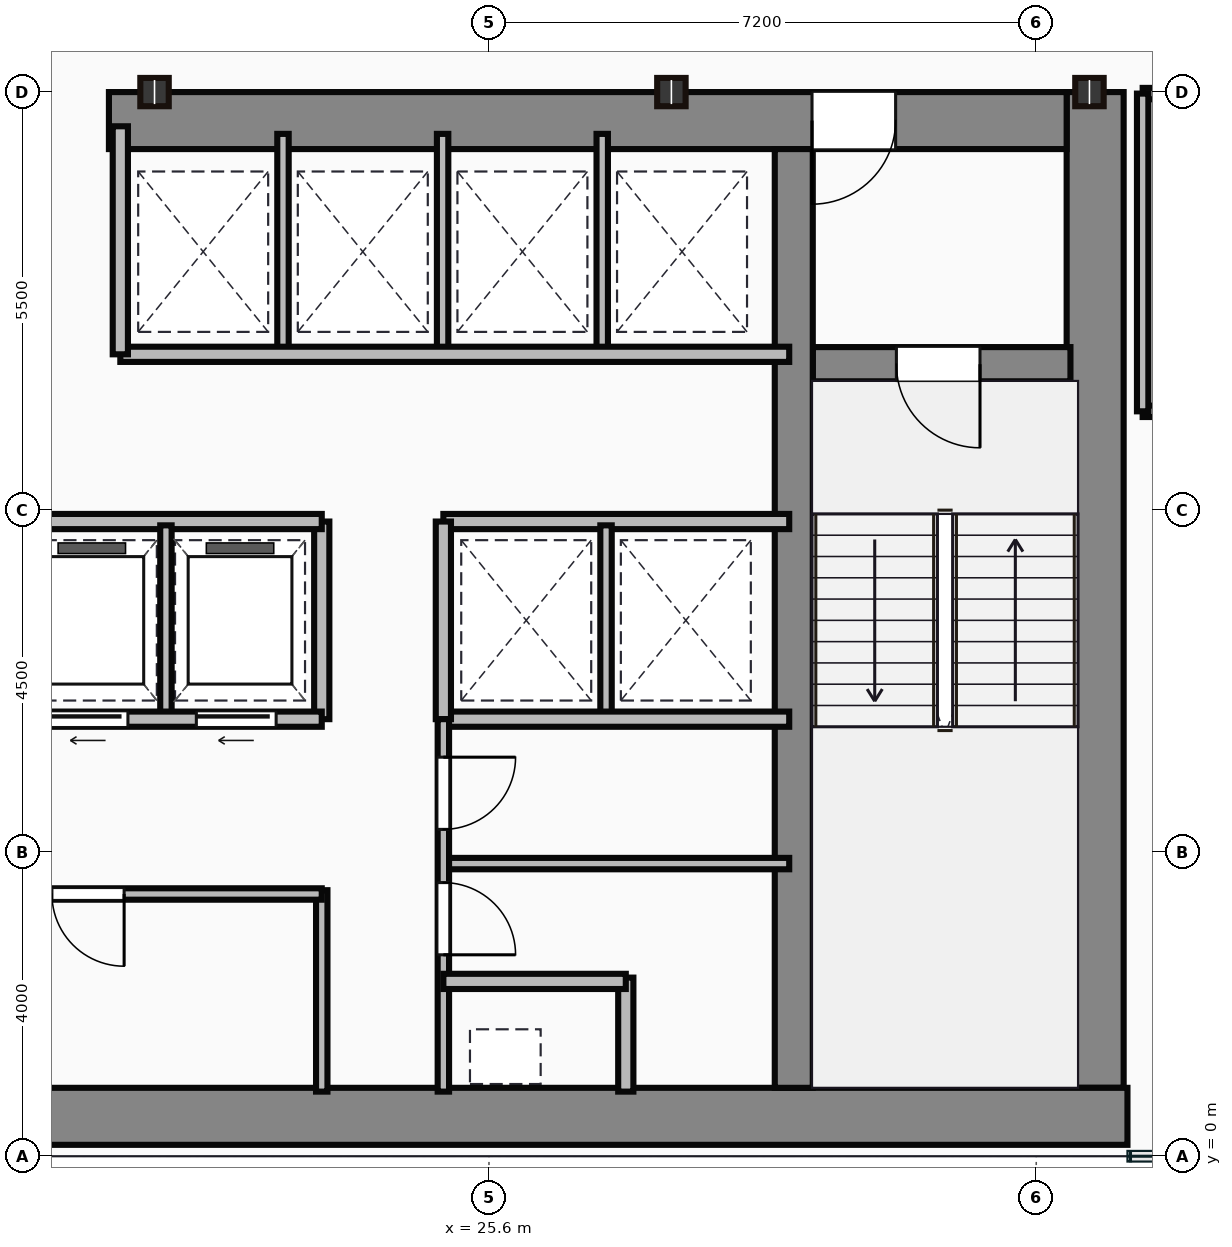
"""IFC4 building model, lengths in metres.
Left out: names, types, materials, properties, quantities, classifications, styles, units other than length and angle.
Written with IfcOpenShell. Run it as: python <this file> out.ifc"""

import sys

from ifc_helpers import new_model, si_unit, direction, frame, frame_2d, origin, origin_2d, place, context, subcontext, project, spatial, rectangle, i_section, extrude, source, transform, mapped, element, fill, save


model = new_model("IFC4")
c1 = context("Model", 3, precision=1e-05, world=origin(), true_north=direction((0.0, 1.0)))
c2 = subcontext(c1, "Body", "Model", "MODEL_VIEW")
j1 = project(units=[si_unit("LENGTHUNIT", "METRE"), si_unit("PLANEANGLEUNIT", "RADIAN")], contexts=[c1])
p1 = place(None, origin())
s1 = spatial("IfcSite", under=j1, at=p1, CompositionType="ELEMENT")
p2 = place(p1, origin())
s2 = spatial("IfcBuilding", under=s1, at=p2, CompositionType="ELEMENT")
p3 = place(p2, frame((0.0, 0.0, 144.25)))
s3 = spatial("IfcBuildingStorey", under=s2, at=p3, CompositionType="ELEMENT", Elevation=144.25)
m1 = source(origin(), c2, "Body", "SweptSolid", [
    extrude(rectangle(XDim=29.5, YDim=0.75, at=frame_2d((14.75, 0.0))), origin(), (0.0, 0.0, 1.0), 3.65),
])
p4 = place(p3, frame((4.5, 0.525, 0.0), z_axis=(0.0, 0.0, 1.0), x_axis=(1.0, 0.0, 0.0)))
e1 = element("IfcWall", 1, at=p4, inside=s3, PredefinedType="SHEAR", context=c2, shape_type="MappedRepresentation", body=[
    mapped(m1, transform((0.0, 0.0, 0.0))),
])
m2 = source(origin(), c2, "Body", "SweptSolid", [
    extrude(rectangle(XDim=13.1, YDim=0.75, at=frame_2d((6.55, 0.0))), origin(), (0.0, 0.0, 1.0), 3.65),
])
p5 = place(p3, frame((33.575, 0.9, 0.0), z_axis=(0.0, 0.0, 1.0), x_axis=(0.0, 1.0, 0.0)))
e2 = element("IfcWall", 2, at=p5, inside=s3, PredefinedType="SHEAR", context=c2, shape_type="MappedRepresentation", body=[
    mapped(m2, transform((0.0, 0.0, 0.0))),
])
m3 = source(origin(), c2, "Body", "SweptSolid", [
    extrude(rectangle(XDim=12.6, YDim=0.75, at=frame_2d((6.3, 0.0))), origin(), (0.0, 0.0, 1.0), 3.65),
])
p6 = place(p3, frame((20.6, 13.625, 0.0), z_axis=(0.0, 0.0, 1.0), x_axis=(1.0, 0.0, 0.0)))
e3 = element("IfcWall", 3, at=p6, inside=s3, PredefinedType="SHEAR", context=c2, shape_type="MappedRepresentation", body=[
    mapped(m3, transform((0.0, 0.0, 0.0))),
])
p7 = place(p6, frame((9.25, 0.0, 0.0)))
e4 = element("IfcOpeningElement", 4, at=p7, cuts=e3, PredefinedType="OPENING", context=c2, shape_type="SweptSolid", body=[
    extrude(rectangle(XDim=1.1, YDim=2.15, at=frame_2d((0.55, 1.075))), frame((0.0, 0.385, 0.0), z_axis=(0.0, -1.0, 0.0), x_axis=(1.0, 0.0, 0.0)), (0.0, 0.0, 1.0), 0.77),
])
m4 = source(origin(), c2, "Body", "SweptSolid", [
    extrude(rectangle(XDim=12.35, YDim=0.5, at=frame_2d((6.175, 0.0))), origin(), (0.0, 0.0, 1.0), 3.65),
])
p8 = place(p3, frame((29.61, 0.9, 0.0), z_axis=(0.0, 0.0, 1.0), x_axis=(0.0, 1.0, 0.0)))
e5 = element("IfcWall", 5, at=p8, inside=s3, PredefinedType="SHEAR", context=c2, shape_type="MappedRepresentation", body=[
    mapped(m4, transform((0.0, 0.0, 0.0))),
])
m5 = source(origin(), c2, "Body", "SweptSolid", [
    extrude(rectangle(XDim=3.39, YDim=0.45, at=frame_2d((1.695, 0.0))), origin(), (0.0, 0.0, 1.0), 3.65),
])
p9 = place(p3, frame((29.86, 10.42, 0.0), z_axis=(0.0, 0.0, 1.0), x_axis=(1.0, 0.0, 0.0)))
e6 = element("IfcWall", 6, at=p9, inside=s3, PredefinedType="SHEAR", context=c2, shape_type="MappedRepresentation", body=[
    mapped(m5, transform((0.0, 0.0, 0.0))),
])
p10 = place(p9, frame((1.1, 0.0, 0.0)))
e7 = element("IfcOpeningElement", 7, at=p10, cuts=e6, PredefinedType="OPENING", context=c2, shape_type="SweptSolid", body=[
    extrude(rectangle(XDim=1.1, YDim=2.15, at=frame_2d((0.55, 1.075))), frame((0.0, 0.235, 0.0), z_axis=(0.0, -1.0, 0.0), x_axis=(1.0, 0.0, 0.0)), (0.0, 0.0, 1.0), 0.47),
])
m6 = source(origin(), c2, "Body", "SweptSolid", [
    extrude(i_section(OverallWidth=0.374, OverallDepth=0.372, WebThickness=0.016, FlangeThickness=0.026, at=origin_2d()), origin(), (0.0, 0.0, 1.0), 3.65),
])
for number, where, z_axis, x_axis in (
    (8, (21.2, 14.0, 0.0), (0.0, 0.0, 1.0), (1.0, 0.0, 0.0)),
    (9, (28.0, 14.0, 0.0), (0.0, 0.0, 1.0), (1.0, 0.0, 0.0)),
    (10, (33.5, 14.0, 0.0), (0.0, 0.0, 1.0), (1.0, 0.0, 0.0)),
):
    element("IfcColumn", number, at=place(p3, frame(where, z_axis=z_axis, x_axis=x_axis)), inside=s3, PredefinedType="COLUMN", context=c2, shape_type="MappedRepresentation", body=[
        mapped(m6, transform((0.0, 0.0, 0.0))),
    ])
m7 = source(origin(), c2, "Body", "SweptSolid", [
    extrude(rectangle(XDim=10.35, YDim=0.15, at=frame_2d((5.175, 0.0))), origin(), (0.0, 0.0, 1.0), 3.4),
])
p11 = place(p3, frame((13.05, 3.45, 0.0), z_axis=(0.0, 0.0, 1.0), x_axis=(1.0, 0.0, 0.0)))
e11 = element("IfcWall", 11, at=p11, inside=s3, PredefinedType="PARTITIONING", context=c2, shape_type="MappedRepresentation", body=[
    mapped(m7, transform((0.0, 0.0, 0.0))),
])
p12 = place(p11, frame((2.1, 0.0, 0.0)))
e12 = element("IfcOpeningElement", 12, at=p12, cuts=e11, PredefinedType="OPENING", context=c2, shape_type="SweptSolid", body=[
    extrude(rectangle(XDim=0.95, YDim=2.15, at=frame_2d((0.475, 1.075))), frame((0.0, 0.085, 0.0), z_axis=(0.0, -1.0, 0.0), x_axis=(1.0, 0.0, 0.0)), (0.0, 0.0, 1.0), 0.17),
])
p13 = place(p11, frame((6.8, 0.0, 0.0)))
e13 = element("IfcOpeningElement", 13, at=p13, cuts=e11, PredefinedType="OPENING", context=c2, shape_type="SweptSolid", body=[
    extrude(rectangle(XDim=0.95, YDim=2.15, at=frame_2d((0.475, 1.075))), frame((0.0, 0.085, 0.0), z_axis=(0.0, -1.0, 0.0), x_axis=(1.0, 0.0, 0.0)), (0.0, 0.0, 1.0), 0.17),
])
m8 = source(origin(), c2, "Body", "SweptSolid", [
    extrude(rectangle(XDim=2.65, YDim=0.15, at=frame_2d((1.325, 0.0))), origin(), (0.0, 0.0, 1.0), 3.4),
])
p14 = place(p3, frame((23.4, 0.85, 0.0), z_axis=(0.0, 0.0, 1.0), x_axis=(0.0, 1.0, 0.0)))
e14 = element("IfcWall", 14, at=p14, inside=s3, PredefinedType="PARTITIONING", context=c2, shape_type="MappedRepresentation", body=[
    mapped(m8, transform((0.0, 0.0, 0.0))),
])
m9 = source(origin(), c2, "Body", "SweptSolid", [
    extrude(rectangle(XDim=11.85, YDim=0.2, at=frame_2d((5.925, 0.0))), origin(), (0.0, 0.0, 1.0), 3.4),
])
p15 = place(p3, frame((11.55, 5.75, 0.0), z_axis=(0.0, 0.0, 1.0), x_axis=(1.0, 0.0, 0.0)))
e15 = element("IfcWall", 15, at=p15, inside=s3, PredefinedType="PARTITIONING", context=c2, shape_type="MappedRepresentation", body=[
    mapped(m9, transform((0.0, 0.0, 0.0))),
])
p16 = place(p15, frame((0.45, 0.0, 0.0)))
e16 = element("IfcOpeningElement", 16, at=p16, cuts=e15, PredefinedType="OPENING", context=c2, shape_type="SweptSolid", body=[
    extrude(rectangle(XDim=1.05, YDim=2.15, at=frame_2d((0.525, 1.075))), frame((0.0, 0.11, 0.0), z_axis=(0.0, -1.0, 0.0), x_axis=(1.0, 0.0, 0.0)), (0.0, 0.0, 1.0), 0.22),
])
p17 = place(p15, frame((2.4, 0.0, 0.0)))
e17 = element("IfcOpeningElement", 17, at=p17, cuts=e15, PredefinedType="OPENING", context=c2, shape_type="SweptSolid", body=[
    extrude(rectangle(XDim=1.05, YDim=2.15, at=frame_2d((0.525, 1.075))), frame((0.0, 0.11, 0.0), z_axis=(0.0, -1.0, 0.0), x_axis=(1.0, 0.0, 0.0)), (0.0, 0.0, 1.0), 0.22),
])
p18 = place(p15, frame((4.35, 0.0, 0.0)))
e18 = element("IfcOpeningElement", 18, at=p18, cuts=e15, PredefinedType="OPENING", context=c2, shape_type="SweptSolid", body=[
    extrude(rectangle(XDim=1.05, YDim=2.15, at=frame_2d((0.525, 1.075))), frame((0.0, 0.11, 0.0), z_axis=(0.0, -1.0, 0.0), x_axis=(1.0, 0.0, 0.0)), (0.0, 0.0, 1.0), 0.22),
])
p19 = place(p15, frame((6.3, 0.0, 0.0)))
e19 = element("IfcOpeningElement", 19, at=p19, cuts=e15, PredefinedType="OPENING", context=c2, shape_type="SweptSolid", body=[
    extrude(rectangle(XDim=1.05, YDim=2.15, at=frame_2d((0.525, 1.075))), frame((0.0, 0.11, 0.0), z_axis=(0.0, -1.0, 0.0), x_axis=(1.0, 0.0, 0.0)), (0.0, 0.0, 1.0), 0.22),
])
p20 = place(p15, frame((8.25, 0.0, 0.0)))
e20 = element("IfcOpeningElement", 20, at=p20, cuts=e15, PredefinedType="OPENING", context=c2, shape_type="SweptSolid", body=[
    extrude(rectangle(XDim=1.05, YDim=2.15, at=frame_2d((0.525, 1.075))), frame((0.0, 0.11, 0.0), z_axis=(0.0, -1.0, 0.0), x_axis=(1.0, 0.0, 0.0)), (0.0, 0.0, 1.0), 0.22),
])
p21 = place(p15, frame((10.2, 0.0, 0.0)))
e21 = element("IfcOpeningElement", 21, at=p21, cuts=e15, PredefinedType="OPENING", context=c2, shape_type="SweptSolid", body=[
    extrude(rectangle(XDim=1.05, YDim=2.15, at=frame_2d((0.525, 1.075))), frame((0.0, 0.11, 0.0), z_axis=(0.0, -1.0, 0.0), x_axis=(1.0, 0.0, 0.0)), (0.0, 0.0, 1.0), 0.22),
])
p22 = place(p3, frame((11.55, 8.35, 0.0), z_axis=(0.0, 0.0, 1.0), x_axis=(1.0, 0.0, 0.0)))
e22 = element("IfcWall", 22, at=p22, inside=s3, PredefinedType="PARTITIONING", context=c2, shape_type="MappedRepresentation", body=[
    mapped(m9, transform((0.0, 0.0, 0.0))),
])
m10 = source(origin(), c2, "Body", "SweptSolid", [
    extrude(rectangle(XDim=2.6, YDim=0.2, at=frame_2d((1.3, 0.0))), origin(), (0.0, 0.0, 1.0), 3.4),
])
p23 = place(p3, frame((23.4, 5.75, 0.0), z_axis=(0.0, 0.0, 1.0), x_axis=(0.0, 1.0, 0.0)))
e23 = element("IfcWall", 23, at=p23, inside=s3, PredefinedType="PARTITIONING", context=c2, shape_type="MappedRepresentation", body=[
    mapped(m10, transform((0.0, 0.0, 0.0))),
])
m11 = source(origin(), c2, "Body", "SweptSolid", [
    extrude(rectangle(XDim=2.5, YDim=0.15, at=frame_2d((1.25, 0.0))), origin(), (0.0, 0.0, 1.0), 3.4),
])
p24 = place(p3, frame((21.35, 5.8, 0.0), z_axis=(0.0, 0.0, 1.0), x_axis=(0.0, 1.0, 0.0)))
e24 = element("IfcWall", 24, at=p24, inside=s3, PredefinedType="PARTITIONING", context=c2, shape_type="MappedRepresentation", body=[
    mapped(m11, transform((0.0, 0.0, 0.0))),
])
m12 = source(origin(), c2, "Body", "SweptSolid", [
    extrude(rectangle(XDim=8.8, YDim=0.2, at=frame_2d((4.4, 0.0))), origin(), (0.0, 0.0, 1.0), 3.4),
])
p25 = place(p3, frame((20.75, 10.55, 0.0), z_axis=(0.0, 0.0, 1.0), x_axis=(1.0, 0.0, 0.0)))
e25 = element("IfcWall", 25, at=p25, inside=s3, PredefinedType="PARTITIONING", context=c2, shape_type="MappedRepresentation", body=[
    mapped(m12, transform((0.0, 0.0, 0.0))),
])
m13 = source(origin(), c2, "Body", "SweptSolid", [
    extrude(rectangle(XDim=3.0, YDim=0.2, at=frame_2d((1.5, 0.0))), origin(), (0.0, 0.0, 1.0), 3.4),
])
p26 = place(p3, frame((20.75, 10.55, 0.0), z_axis=(0.0, 0.0, 1.0), x_axis=(0.0, 1.0, 0.0)))
e26 = element("IfcWall", 26, at=p26, inside=s3, PredefinedType="PARTITIONING", context=c2, shape_type="MappedRepresentation", body=[
    mapped(m13, transform((0.0, 0.0, 0.0))),
])
m14 = source(origin(), c2, "Body", "SweptSolid", [
    extrude(rectangle(XDim=2.85, YDim=0.15, at=frame_2d((1.425, 0.0))), origin(), (0.0, 0.0, 1.0), 3.4),
])
for number, where, z_axis, x_axis in (
    (27, (22.89, 10.6, 0.0), (0.0, 0.0, 1.0), (0.0, 1.0, 0.0)),
    (28, (24.99, 10.6, 0.0), (0.0, 0.0, 1.0), (0.0, 1.0, 0.0)),
    (29, (27.09, 10.6, 0.0), (0.0, 0.0, 1.0), (0.0, 1.0, 0.0)),
):
    element("IfcWall", number, at=place(p3, frame(where, z_axis=z_axis, x_axis=x_axis)), inside=s3, PredefinedType="PARTITIONING", context=c2, shape_type="MappedRepresentation", body=[
        mapped(m14, transform((0.0, 0.0, 0.0))),
    ])
m15 = source(origin(), c2, "Body", "SweptSolid", [
    extrude(rectangle(XDim=4.55, YDim=0.2, at=frame_2d((2.275, 0.0))), origin(), (0.0, 0.0, 1.0), 3.4),
])
for number, where, z_axis, x_axis in (
    (30, (25.0, 8.35, 0.0), (0.0, 0.0, 1.0), (1.0, 0.0, 0.0)),
    (31, (25.0, 5.75, 0.0), (0.0, 0.0, 1.0), (1.0, 0.0, 0.0)),
):
    element("IfcWall", number, at=place(p3, frame(where, z_axis=z_axis, x_axis=x_axis)), inside=s3, PredefinedType="PARTITIONING", context=c2, shape_type="MappedRepresentation", body=[
        mapped(m15, transform((0.0, 0.0, 0.0))),
    ])
p27 = place(p3, frame((25.0, 5.75, 0.0), z_axis=(0.0, 0.0, 1.0), x_axis=(0.0, 1.0, 0.0)))
e32 = element("IfcWall", 32, at=p27, inside=s3, PredefinedType="PARTITIONING", context=c2, shape_type="MappedRepresentation", body=[
    mapped(m10, transform((0.0, 0.0, 0.0))),
])
p28 = place(p3, frame((27.14, 5.8, 0.0), z_axis=(0.0, 0.0, 1.0), x_axis=(0.0, 1.0, 0.0)))
e33 = element("IfcWall", 33, at=p28, inside=s3, PredefinedType="PARTITIONING", context=c2, shape_type="MappedRepresentation", body=[
    mapped(m11, transform((0.0, 0.0, 0.0))),
])
m16 = source(origin(), c2, "Body", "SweptSolid", [
    extrude(rectangle(XDim=4.9, YDim=0.15, at=frame_2d((2.45, 0.0))), origin(), (0.0, 0.0, 1.0), 3.4),
])
p29 = place(p3, frame((25.0, 0.85, 0.0), z_axis=(0.0, 0.0, 1.0), x_axis=(0.0, 1.0, 0.0)))
e34 = element("IfcWall", 34, at=p29, inside=s3, PredefinedType="PARTITIONING", context=c2, shape_type="MappedRepresentation", body=[
    mapped(m16, transform((0.0, 0.0, 0.0))),
])
p30 = place(p29, frame((1.8, 0.0, 0.0)))
e35 = element("IfcOpeningElement", 35, at=p30, cuts=e34, PredefinedType="OPENING", context=c2, shape_type="SweptSolid", body=[
    extrude(rectangle(XDim=0.95, YDim=2.15, at=frame_2d((0.475, 1.075))), frame((0.0, 0.085, 0.0), z_axis=(0.0, -1.0, 0.0), x_axis=(1.0, 0.0, 0.0)), (0.0, 0.0, 1.0), 0.17),
])
p31 = place(p29, frame((3.45, 0.0, 0.0)))
e36 = element("IfcOpeningElement", 36, at=p31, cuts=e34, PredefinedType="OPENING", context=c2, shape_type="SweptSolid", body=[
    extrude(rectangle(XDim=0.95, YDim=2.15, at=frame_2d((0.475, 1.075))), frame((0.0, 0.085, 0.0), z_axis=(0.0, -1.0, 0.0), x_axis=(1.0, 0.0, 0.0)), (0.0, 0.0, 1.0), 0.17),
])
m17 = source(origin(), c2, "Body", "SweptSolid", [
    extrude(rectangle(XDim=2.4, YDim=0.2, at=frame_2d((1.2, 0.0))), origin(), (0.0, 0.0, 1.0), 3.4),
])
p32 = place(p3, frame((25.0, 2.3, 0.0), z_axis=(0.0, 0.0, 1.0), x_axis=(1.0, 0.0, 0.0)))
e37 = element("IfcWall", 37, at=p32, inside=s3, PredefinedType="PARTITIONING", context=c2, shape_type="MappedRepresentation", body=[
    mapped(m17, transform((0.0, 0.0, 0.0))),
])
m18 = source(origin(), c2, "Body", "SweptSolid", [
    extrude(rectangle(XDim=1.5, YDim=0.2, at=frame_2d((0.75, 0.0))), origin(), (0.0, 0.0, 1.0), 3.4),
])
p33 = place(p3, frame((27.4, 0.85, 0.0), z_axis=(0.0, 0.0, 1.0), x_axis=(0.0, 1.0, 0.0)))
e38 = element("IfcWall", 38, at=p33, inside=s3, PredefinedType="PARTITIONING", context=c2, shape_type="MappedRepresentation", body=[
    mapped(m18, transform((0.0, 0.0, 0.0))),
])
m19 = source(origin(), c2, "Body", "SweptSolid", [
    extrude(rectangle(XDim=4.55, YDim=0.15, at=frame_2d((2.275, 0.0))), origin(), (0.0, 0.0, 1.0), 3.4),
])
p34 = place(p3, frame((25.0, 3.85, 0.0), z_axis=(0.0, 0.0, 1.0), x_axis=(1.0, 0.0, 0.0)))
e39 = element("IfcWall", 39, at=p34, inside=s3, PredefinedType="PARTITIONING", context=c2, shape_type="MappedRepresentation", body=[
    mapped(m19, transform((0.0, 0.0, 0.0))),
])
m20 = source(origin(), c2, "Body", "SweptSolid", [
    extrude(rectangle(XDim=4.8, YDim=0.15, at=frame_2d((2.4, 0.0))), origin(), (0.0, 0.0, 1.0), 2.76),
])
p35 = place(p3, frame((34.2, 13.98, 0.0), z_axis=(0.0, 0.0, 1.0), x_axis=(1.0, 0.0, 0.0)))
e40 = element("IfcWall", 40, at=p35, inside=s3, PredefinedType="PARTITIONING", context=c2, shape_type="MappedRepresentation", body=[
    mapped(m20, transform((0.0, 0.0, 0.0))),
])
p36 = place(p35, frame((0.35, 0.0, 0.0)))
e41 = element("IfcOpeningElement", 41, at=p36, cuts=e40, PredefinedType="OPENING", context=c2, shape_type="SweptSolid", body=[
    extrude(rectangle(XDim=0.85, YDim=2.1, at=frame_2d((0.425, 1.05))), frame((0.0, 0.085, 0.0), z_axis=(0.0, -1.0, 0.0), x_axis=(1.0, 0.0, 0.0)), (0.0, 0.0, 1.0), 0.17),
])
p37 = place(p35, frame((1.95, 0.0, 0.0)))
e42 = element("IfcOpeningElement", 42, at=p37, cuts=e40, PredefinedType="OPENING", context=c2, shape_type="SweptSolid", body=[
    extrude(rectangle(XDim=0.85, YDim=2.1, at=frame_2d((0.425, 1.05))), frame((0.0, 0.085, 0.0), z_axis=(0.0, -1.0, 0.0), x_axis=(1.0, 0.0, 0.0)), (0.0, 0.0, 1.0), 0.17),
])
p38 = place(p35, frame((3.5, 0.0, 0.0)))
e43 = element("IfcOpeningElement", 43, at=p38, cuts=e40, PredefinedType="OPENING", context=c2, shape_type="SweptSolid", body=[
    extrude(rectangle(XDim=0.9, YDim=2.1, at=frame_2d((0.45, 1.05))), frame((0.0, 0.085, 0.0), z_axis=(0.0, -1.0, 0.0), x_axis=(1.0, 0.0, 0.0)), (0.0, 0.0, 1.0), 0.17),
])
m21 = source(origin(), c2, "Body", "SweptSolid", [
    extrude(rectangle(XDim=4.8, YDim=0.15, at=frame_2d((2.4, 0.0))), origin(), (0.0, 0.0, 1.0), 3.4),
])
p39 = place(p3, frame((34.2, 9.8, 0.0), z_axis=(0.0, 0.0, 1.0), x_axis=(1.0, 0.0, 0.0)))
e44 = element("IfcWall", 44, at=p39, inside=s3, PredefinedType="PARTITIONING", context=c2, shape_type="MappedRepresentation", body=[
    mapped(m21, transform((0.0, 0.0, 0.0))),
])
m22 = source(origin(), c2, "Body", "SweptSolid", [
    extrude(rectangle(XDim=4.18, YDim=0.15, at=frame_2d((2.09, 0.0))), origin(), (0.0, 0.0, 1.0), 3.4),
])
p40 = place(p3, frame((34.2, 9.8, 0.0), z_axis=(0.0, 0.0, 1.0), x_axis=(0.0, 1.0, 0.0)))
e45 = element("IfcWall", 45, at=p40, inside=s3, PredefinedType="PARTITIONING", context=c2, shape_type="MappedRepresentation", body=[
    mapped(m22, transform((0.0, 0.0, 0.0))),
])
m23 = source(origin(), c2, "Body", "SweptSolid", [
    extrude(rectangle(XDim=1.1, YDim=2.15, at=frame_2d((0.55, 1.075))), frame((0.0, 0.025, 0.0), z_axis=(0.0, -1.0, 0.0), x_axis=(1.0, 0.0, 0.0)), (0.0, 0.0, 1.0), 0.05),
])
p41 = place(p10, frame((1.1, 0.0, 0.0), z_axis=(0.0, 0.0, 1.0), x_axis=(-1.0, 0.0, 0.0)))
e46 = element("IfcDoor", 46, at=p41, inside=s3, OperationType="SINGLE_SWING_RIGHT", PredefinedType="DOOR", context=c2, shape_type="MappedRepresentation", body=[
    mapped(m23, transform((0.0, 0.0, 0.0))),
])
fill(e7, e46)
p42 = place(p7, origin())
e47 = element("IfcDoor", 47, at=p42, inside=s3, OperationType="SINGLE_SWING_LEFT", PredefinedType="DOOR", context=c2, shape_type="MappedRepresentation", body=[
    mapped(m23, transform((0.0, 0.0, 0.0))),
])
fill(e4, e47)
m24 = source(origin(), c2, "Body", "SweptSolid", [
    extrude(rectangle(XDim=0.95, YDim=2.15, at=frame_2d((0.475, 1.075))), frame((0.0, 0.025, 0.0), z_axis=(0.0, -1.0, 0.0), x_axis=(1.0, 0.0, 0.0)), (0.0, 0.0, 1.0), 0.05),
])
p43 = place(p13, origin())
e48 = element("IfcDoor", 48, at=p43, inside=s3, OperationType="SINGLE_SWING_RIGHT", PredefinedType="DOOR", context=c2, shape_type="MappedRepresentation", body=[
    mapped(m24, transform((0.0, 0.0, 0.0))),
])
fill(e13, e48)
m25 = source(origin(), c2, "Body", "SweptSolid", [
    extrude(rectangle(XDim=1.05, YDim=2.15, at=frame_2d((0.525, 1.075))), frame((0.0, 0.025, 0.0), z_axis=(0.0, -1.0, 0.0), x_axis=(1.0, 0.0, 0.0)), (0.0, 0.0, 1.0), 0.05),
])
p44 = place(p20, frame((1.05, 0.0, 0.0), z_axis=(0.0, 0.0, 1.0), x_axis=(-1.0, 0.0, 0.0)))
e49 = element("IfcDoor", 49, at=p44, inside=s3, OperationType="SLIDING_TO_LEFT", PredefinedType="DOOR", context=c2, shape_type="MappedRepresentation", body=[
    mapped(m25, transform((0.0, 0.0, 0.0))),
])
fill(e20, e49)
p45 = place(p21, frame((1.05, 0.0, 0.0), z_axis=(0.0, 0.0, 1.0), x_axis=(-1.0, 0.0, 0.0)))
e50 = element("IfcDoor", 50, at=p45, inside=s3, OperationType="SLIDING_TO_LEFT", PredefinedType="DOOR", context=c2, shape_type="MappedRepresentation", body=[
    mapped(m25, transform((0.0, 0.0, 0.0))),
])
fill(e21, e50)
p46 = place(p30, origin())
e51 = element("IfcDoor", 51, at=p46, inside=s3, OperationType="SINGLE_SWING_LEFT", PredefinedType="DOOR", context=c2, shape_type="MappedRepresentation", body=[
    mapped(m24, transform((0.0, 0.0, 0.0))),
])
fill(e35, e51)
p47 = place(p31, origin())
e52 = element("IfcDoor", 52, at=p47, inside=s3, OperationType="SINGLE_SWING_RIGHT", PredefinedType="DOOR", context=c2, shape_type="MappedRepresentation", body=[
    mapped(m24, transform((0.0, 0.0, 0.0))),
])
fill(e36, e52)
save(model, sys.argv[1])
